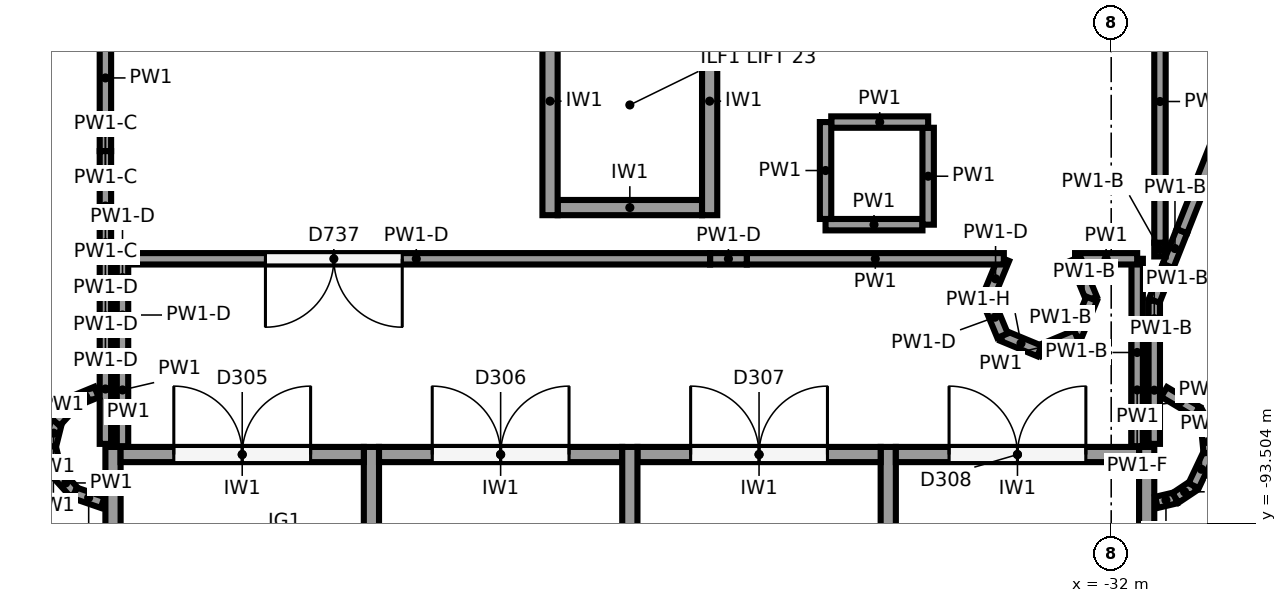
"""IFC4 building model, lengths in metres.
Left out: names, types, materials, properties, quantities, classifications, styles, units other than length and angle.
Written with IfcOpenShell. Run it as: python <this file> out.ifc"""

import sys

from ifc_helpers import new_model, si_unit, direction, frame, frame_2d, origin, origin_2d, place, context, subcontext, project, spatial, rectangle, circle, extrude, element, fill, save


model = new_model("IFC4")
c1 = context("Model", 3, precision=1e-05, world=origin(), true_north=direction((0.0, 1.0)))
c2 = subcontext(c1, "Body", "Model", "MODEL_VIEW")
j1 = project(units=[si_unit("LENGTHUNIT", "METRE"), si_unit("PLANEANGLEUNIT", "RADIAN")], contexts=[c1])
p1 = place(None, origin())
s1 = spatial("IfcSite", under=j1, at=p1, CompositionType="ELEMENT")
p2 = place(p1, origin())
s2 = spatial("IfcBuilding", under=s1, at=p2, CompositionType="ELEMENT")
p3 = place(p2, frame((0.0, 0.0, -4.0)))
s3 = spatial("IfcBuildingStorey", under=s2, at=p3, CompositionType="ELEMENT", Elevation=-4.0)
p4 = place(p3, frame((-46.333, -90.126, -1.2), z_axis=(0.0, 0.0, 1.0), x_axis=(1.0, 0.0, 0.0)))
e1 = element("IfcColumn", 1, at=p4, inside=s3, PredefinedType="COLUMN", context=c2, shape_type="SweptSolid", body=[
    extrude(circle(Radius=0.45, at=origin_2d()), origin(), (0.0, 0.0, 1.0), 5.2),
])
p5 = place(p3, frame((-32.944, -90.551, -1.2), z_axis=(0.0, 0.0, 1.0), x_axis=(1.0, 0.0, 0.0)))
e2 = element("IfcColumn", 2, at=p5, inside=s3, PredefinedType="COLUMN", context=c2, shape_type="SweptSolid", body=[
    extrude(circle(Radius=0.55, at=origin_2d()), origin(), (0.0, 0.0, 1.0), 5.2),
])
for number, where, z_axis, x_axis in (
    (3, (-45.133, -101.6, -1.2), (0.0, 0.0, 1.0), (0.0, 1.0, 0.0)),
    (4, (-38.333, -101.6, -1.2), (0.0, 0.0, 1.0), (0.0, 1.0, 0.0)),
    (5, (-31.533, -101.6, -1.2), (0.0, 0.0, 1.0), (0.0, 1.0, 0.0)),
    (6, (-41.733, -101.6, -1.2), (0.0, 0.0, 1.0), (0.0, 1.0, 0.0)),
    (7, (-34.933, -101.6, -1.2), (0.0, 0.0, 1.0), (0.0, 1.0, 0.0)),
):
    element("IfcWall", number, at=place(p3, frame(where, z_axis=z_axis, x_axis=x_axis)), inside=s3, PredefinedType="SHEAR", context=c2, shape_type="SweptSolid", body=[
        extrude(rectangle(XDim=9.1, YDim=0.2, at=frame_2d((4.55, 0.0))), origin(), (0.0, 0.0, 1.0), 4.8),
    ])
p6 = place(p3, frame((-45.033, -92.6, -1.2), z_axis=(0.0, 0.0, 1.0), x_axis=(1.0, 0.0, 0.0)))
e8 = element("IfcWall", 8, at=p6, inside=s3, PredefinedType="SHEAR", context=c2, shape_type="SweptSolid", body=[
    extrude(rectangle(XDim=3.2, YDim=0.2, at=frame_2d((1.6, 0.0))), origin(), (0.0, 0.0, 1.0), 4.8),
])
p7 = place(p6, frame((0.7, 0.0, 1.2)))
e9 = element("IfcOpeningElement", 9, at=p7, cuts=e8, PredefinedType="OPENING", context=c2, shape_type="SweptSolid", body=[
    extrude(rectangle(XDim=1.8, YDim=2.1, at=frame_2d((0.9, 1.05))), frame((0.0, 0.11, 0.0), z_axis=(0.0, -1.0, 0.0), x_axis=(1.0, 0.0, 0.0)), (0.0, 0.0, 1.0), 0.22),
])
p8 = place(p3, frame((-41.633, -92.6, -1.2), z_axis=(0.0, 0.0, 1.0), x_axis=(1.0, 0.0, 0.0)))
e10 = element("IfcWall", 10, at=p8, inside=s3, PredefinedType="SHEAR", context=c2, shape_type="SweptSolid", body=[
    extrude(rectangle(XDim=3.2, YDim=0.2, at=frame_2d((1.6, 0.0))), origin(), (0.0, 0.0, 1.0), 4.8),
])
p9 = place(p8, frame((0.7, 0.0, 1.2)))
e11 = element("IfcOpeningElement", 11, at=p9, cuts=e10, PredefinedType="OPENING", context=c2, shape_type="SweptSolid", body=[
    extrude(rectangle(XDim=1.8, YDim=2.1, at=frame_2d((0.9, 1.05))), frame((0.0, 0.11, 0.0), z_axis=(0.0, -1.0, 0.0), x_axis=(1.0, 0.0, 0.0)), (0.0, 0.0, 1.0), 0.22),
])
p10 = place(p3, frame((-38.233, -92.6, -1.2), z_axis=(0.0, 0.0, 1.0), x_axis=(1.0, 0.0, 0.0)))
e12 = element("IfcWall", 12, at=p10, inside=s3, PredefinedType="SHEAR", context=c2, shape_type="SweptSolid", body=[
    extrude(rectangle(XDim=3.2, YDim=0.2, at=frame_2d((1.6, 0.0))), origin(), (0.0, 0.0, 1.0), 4.8),
])
p11 = place(p10, frame((0.7, 0.0, 1.2)))
e13 = element("IfcOpeningElement", 13, at=p11, cuts=e12, PredefinedType="OPENING", context=c2, shape_type="SweptSolid", body=[
    extrude(rectangle(XDim=1.8, YDim=2.1, at=frame_2d((0.9, 1.05))), frame((0.0, 0.11, 0.0), z_axis=(0.0, -1.0, 0.0), x_axis=(1.0, 0.0, 0.0)), (0.0, 0.0, 1.0), 0.22),
])
p12 = place(p3, frame((-34.833, -92.6, -1.2), z_axis=(0.0, 0.0, 1.0), x_axis=(1.0, 0.0, 0.0)))
e14 = element("IfcWall", 14, at=p12, inside=s3, PredefinedType="SHEAR", context=c2, shape_type="SweptSolid", body=[
    extrude(rectangle(XDim=3.2, YDim=0.2, at=frame_2d((1.6, 0.0))), origin(), (0.0, 0.0, 1.0), 4.8),
])
p13 = place(p12, frame((0.7, 0.0, 1.2)))
e15 = element("IfcOpeningElement", 15, at=p13, cuts=e14, PredefinedType="OPENING", context=c2, shape_type="SweptSolid", body=[
    extrude(rectangle(XDim=1.8, YDim=2.1, at=frame_2d((0.9, 1.05))), frame((0.0, 0.11, 0.0), z_axis=(0.0, -1.0, 0.0), x_axis=(1.0, 0.0, 0.0)), (0.0, 0.0, 1.0), 0.22),
])
for number, where, z_axis, x_axis in (
    (16, (-39.383, -89.451, -1.2), (0.0, 0.0, 1.0), (0.0, 1.0, 0.0)),
    (17, (-37.283, -89.451, -1.2), (0.0, 0.0, 1.0), (0.0, 1.0, 0.0)),
):
    element("IfcWall", number, at=place(p3, frame(where, z_axis=z_axis, x_axis=x_axis)), inside=s3, PredefinedType="SHEAR", context=c2, shape_type="SweptSolid", body=[
        extrude(rectangle(XDim=3.0, YDim=0.2, at=frame_2d((1.5, 0.0))), origin(), (0.0, 0.0, 1.0), 4.8),
    ])
p14 = place(p3, frame((-39.283, -89.351, -1.2), z_axis=(0.0, 0.0, 1.0), x_axis=(1.0, 0.0, 0.0)))
e18 = element("IfcWall", 18, at=p14, inside=s3, PredefinedType="SHEAR", context=c2, shape_type="SweptSolid", body=[
    extrude(rectangle(XDim=1.9, YDim=0.2, at=frame_2d((0.95, 0.0))), origin(), (0.0, 0.0, 1.0), 4.8),
])
p15 = place(p3, frame((-45.233, -87.164, 0.0), z_axis=(0.0, 0.0, 1.0), x_axis=(0.0, -1.0, 0.0)))
e19 = element("IfcWall", 19, at=p15, inside=s3, PredefinedType="PARTITIONING", context=c2, shape_type="SweptSolid", body=[
    extrude(rectangle(XDim=0.963, YDim=0.15, at=frame_2d((0.481, 0.0))), origin(), (0.0, 0.0, 1.0), 3.6),
])
for number, where, z_axis, x_axis in (
    (20, (-45.233, -88.127, 0.0), (0.0, 0.0, 1.0), (0.0, -1.0, 0.0)),
    (21, (-45.233, -88.608, 0.0), (0.0, 0.0, 1.0), (0.0, -1.0, 0.0)),
    (22, (-45.233, -89.09, 0.0), (0.0, 0.0, 1.0), (0.0, -1.0, 0.0)),
):
    element("IfcWall", number, at=place(p3, frame(where, z_axis=z_axis, x_axis=x_axis)), inside=s3, PredefinedType="PARTITIONING", context=c2, shape_type="SweptSolid", body=[
        extrude(rectangle(XDim=0.481, YDim=0.15, at=frame_2d((0.241, 0.0))), origin(), (0.0, 0.0, 1.0), 2.7),
    ])
for number, where, z_axis, x_axis in (
    (23, (-45.233, -89.571, 0.0), (0.0, 0.0, 1.0), (0.0, -1.0, 0.0)),
    (24, (-45.233, -90.053, 0.0), (0.0, 0.0, 1.0), (0.0, -1.0, 0.0)),
    (25, (-45.233, -90.534, 0.0), (0.0, 0.0, 1.0), (0.0, -1.0, 0.0)),
):
    element("IfcWall", number, at=place(p3, frame(where, z_axis=z_axis, x_axis=x_axis)), inside=s3, PredefinedType="PARTITIONING", context=c2, shape_type="SweptSolid", body=[
        extrude(rectangle(XDim=0.481, YDim=0.15, at=frame_2d((0.241, 0.0))), origin(), (0.0, 0.0, 1.0), 2.3),
    ])
p16 = place(p3, frame((-45.233, -91.016, 0.0), z_axis=(0.0, 0.0, 1.0), x_axis=(0.0, -1.0, 0.0)))
e26 = element("IfcWall", 26, at=p16, inside=s3, PredefinedType="PARTITIONING", context=c2, shape_type="SweptSolid", body=[
    extrude(rectangle(XDim=1.444, YDim=0.15, at=frame_2d((0.722, 0.0))), origin(), (0.0, 0.0, 1.0), 3.6),
])
p17 = place(p3, frame((-31.433, -92.46, 0.0), z_axis=(0.0, 0.0, 1.0), x_axis=(0.0, 1.0, 0.0)))
e27 = element("IfcWall", 27, at=p17, inside=s3, PredefinedType="PARTITIONING", context=c2, shape_type="SweptSolid", body=[
    extrude(rectangle(XDim=1.413, YDim=0.15, at=frame_2d((0.706, 0.0))), origin(), (0.0, 0.0, 1.0), 3.6),
])
p18 = place(p3, frame((-31.433, -91.047, 0.0), z_axis=(0.0, 0.0, 1.0), x_axis=(0.0, 1.0, 0.0)))
e28 = element("IfcWall", 28, at=p18, inside=s3, PredefinedType="PARTITIONING", context=c2, shape_type="SweptSolid", body=[
    extrude(rectangle(XDim=0.471, YDim=0.15, at=frame_2d((0.235, 0.0))), origin(), (0.0, 0.0, 1.0), 2.5),
])
for number, where, z_axis, x_axis in (
    (29, (-31.433, -90.577, 0.0), (0.0, 0.0, 1.0), (0.369, 0.929, 0.0)),
    (30, (-31.252, -90.119, 0.0), (0.0, 0.0, 1.0), (0.369, 0.929, 0.0)),
):
    element("IfcWall", number, at=place(p3, frame(where, z_axis=z_axis, x_axis=x_axis)), inside=s3, PredefinedType="PARTITIONING", context=c2, shape_type="SweptSolid", body=[
        extrude(rectangle(XDim=0.492, YDim=0.15, at=frame_2d((0.246, 0.0))), origin(), (0.0, 0.0, 1.0), 2.5),
    ])
p19 = place(p3, frame((-31.07, -89.661, 0.0), z_axis=(0.0, 0.0, 1.0), x_axis=(0.368825125467, 0.9294988041, 0.0)))
e31 = element("IfcWall", 31, at=p19, inside=s3, PredefinedType="PARTITIONING", context=c2, shape_type="SweptSolid", body=[
    extrude(rectangle(XDim=2.462, YDim=0.15, at=frame_2d((1.231, 0.0))), origin(), (0.0, 0.0, 1.0), 3.6),
])
p20 = place(p3, frame((-35.758, -89.576, 0.0), z_axis=(0.0, 0.0, 1.0), x_axis=(1.0, 0.0, 0.0)))
e32 = element("IfcWall", 32, at=p20, inside=s3, PredefinedType="PARTITIONING", context=c2, shape_type="SweptSolid", body=[
    extrude(rectangle(XDim=1.275, YDim=0.15, at=frame_2d((0.637, 0.0))), origin(), (0.0, 0.0, 1.0), 3.6),
])
for number, where, z_axis, x_axis in (
    (33, (-34.408, -89.576, 0.0), (0.0, 0.0, 1.0), (0.0, 1.0, 0.0)),
    (34, (-34.408, -88.226, 0.0), (0.0, 0.0, 1.0), (-1.0, 0.0, 0.0)),
    (35, (-35.758, -88.226, 0.0), (0.0, 0.0, 1.0), (0.0, -1.0, 0.0)),
):
    element("IfcWall", number, at=place(p3, frame(where, z_axis=z_axis, x_axis=x_axis)), inside=s3, PredefinedType="PARTITIONING", context=c2, shape_type="SweptSolid", body=[
        extrude(rectangle(XDim=1.275, YDim=0.15, at=frame_2d((0.638, 0.0))), origin(), (0.0, 0.0, 1.0), 3.6),
    ])
p21 = place(p3, frame((-31.658, -92.49, 0.0), z_axis=(0.0, 0.0, 1.0), x_axis=(0.0, 1.0, 0.0)))
e36 = element("IfcWall", 36, at=p21, inside=s3, PredefinedType="PARTITIONING", context=c2, shape_type="SweptSolid", body=[
    extrude(rectangle(XDim=2.465, YDim=0.15, at=frame_2d((1.232, 0.0))), origin(), (0.0, 0.0, 1.0), 2.5),
])
p22 = place(p3, frame((-31.658, -92.49, 2.5), z_axis=(0.0, 0.0, 1.0), x_axis=(0.0, 1.0, 0.0)))
e37 = element("IfcWall", 37, at=p22, inside=s3, PredefinedType="PARTITIONING", context=c2, shape_type="SweptSolid", body=[
    extrude(rectangle(XDim=1.479, YDim=0.15, at=frame_2d((0.74, 0.0))), origin(), (0.0, 0.0, 1.0), 1.1),
])
p23 = place(p3, frame((-31.658, -90.025, 0.0), z_axis=(0.0, 0.0, 1.0), x_axis=(-1.0, 0.0, 0.0)))
e38 = element("IfcWall", 38, at=p23, inside=s3, PredefinedType="PARTITIONING", context=c2, shape_type="SweptSolid", body=[
    extrude(rectangle(XDim=0.817, YDim=0.15, at=frame_2d((0.409, 0.0))), origin(), (0.0, 0.0, 1.0), 3.6),
])
p24 = place(p3, frame((-32.475, -90.025, 0.0), z_axis=(0.0, 0.0, 1.0), x_axis=(0.382452777268, -0.923975039252, 0.0)))
e39 = element("IfcWall", 39, at=p24, inside=s3, PredefinedType="PARTITIONING", context=c2, shape_type="SweptSolid", body=[
    extrude(rectangle(XDim=0.569, YDim=0.15, at=frame_2d((0.285, 0.0))), origin(), (0.0, 0.0, 1.0), 2.5),
])
p25 = place(p3, frame((-32.258, -90.551, 0.0), z_axis=(0.0, 0.0, 1.0), x_axis=(-0.382666625355, -0.923886494024, 0.0)))
e40 = element("IfcWall", 40, at=p25, inside=s3, PredefinedType="PARTITIONING", context=c2, shape_type="SweptSolid", body=[
    extrude(rectangle(XDim=0.525, YDim=0.15, at=frame_2d((0.263, 0.0))), origin(), (0.0, 0.0, 1.0), 2.5),
])
p26 = place(p3, frame((-32.458, -91.036, 0.0), z_axis=(0.0, 0.0, 1.0), x_axis=(-0.923694016012, -0.383131002117, 0.0)))
e41 = element("IfcWall", 41, at=p26, inside=s3, PredefinedType="PARTITIONING", context=c2, shape_type="SweptSolid", body=[
    extrude(rectangle(XDim=0.526, YDim=0.15, at=frame_2d((0.263, 0.0))), origin(), (0.0, 0.0, 1.0), 3.6),
])
p27 = place(p3, frame((-32.944, -91.238, 0.0), z_axis=(0.0, 0.0, 1.0), x_axis=(-0.923625802966, 0.383295416221, 0.0)))
e42 = element("IfcWall", 42, at=p27, inside=s3, PredefinedType="PARTITIONING", context=c2, shape_type="SweptSolid", body=[
    extrude(rectangle(XDim=0.525, YDim=0.15, at=frame_2d((0.263, 0.0))), origin(), (0.0, 0.0, 1.0), 3.0),
])
p28 = place(p3, frame((-33.429, -91.036, 0.0), z_axis=(0.0, 0.0, 1.0), x_axis=(-0.382666625355, 0.923886494024, 0.0)))
e43 = element("IfcWall", 43, at=p28, inside=s3, PredefinedType="PARTITIONING", context=c2, shape_type="SweptSolid", body=[
    extrude(rectangle(XDim=0.525, YDim=0.15, at=frame_2d((0.263, 0.0))), origin(), (0.0, 0.0, 1.0), 2.3),
])
p29 = place(p3, frame((-33.63, -90.551, 0.0), z_axis=(0.0, 0.0, 1.0), x_axis=(0.382452777268, 0.923975039252, 0.0)))
e44 = element("IfcWall", 44, at=p29, inside=s3, PredefinedType="PARTITIONING", context=c2, shape_type="SweptSolid", body=[
    extrude(rectangle(XDim=0.569, YDim=0.15, at=frame_2d((0.285, 0.0))), origin(), (0.0, 0.0, 1.0), 2.3),
])
p30 = place(p3, frame((-33.413, -90.025, 0.0), z_axis=(0.0, 0.0, 1.0), x_axis=(-1.0, 0.0, 0.0)))
e45 = element("IfcWall", 45, at=p30, inside=s3, PredefinedType="PARTITIONING", context=c2, shape_type="SweptSolid", body=[
    extrude(rectangle(XDim=3.382, YDim=0.15, at=frame_2d((1.691, 0.0))), origin(), (0.0, 0.0, 1.0), 3.6),
])
p31 = place(p3, frame((-36.795, -90.025, 0.0), z_axis=(0.0, 0.0, 1.0), x_axis=(-1.0, 0.0, 0.0)))
e46 = element("IfcWall", 46, at=p31, inside=s3, PredefinedType="PARTITIONING", context=c2, shape_type="SweptSolid", body=[
    extrude(rectangle(XDim=0.483, YDim=0.15, at=frame_2d((0.242, 0.0))), origin(), (0.0, 0.0, 1.0), 2.3),
])
p32 = place(p3, frame((-37.278, -90.025, 0.0), z_axis=(0.0, 0.0, 1.0), x_axis=(-1.0, 0.0, 0.0)))
e47 = element("IfcWall", 47, at=p32, inside=s3, PredefinedType="PARTITIONING", context=c2, shape_type="SweptSolid", body=[
    extrude(rectangle(XDim=7.73, YDim=0.15, at=frame_2d((3.865, 0.0))), origin(), (0.0, 0.0, 1.0), 2.3),
])
p33 = place(p32, frame((4.05, 0.0, 0.0)))
e48 = element("IfcOpeningElement", 48, at=p33, cuts=e47, PredefinedType="OPENING", context=c2, shape_type="SweptSolid", body=[
    extrude(rectangle(XDim=1.8, YDim=2.1, at=frame_2d((0.9, 1.05))), frame((0.0, 0.085, 0.0), z_axis=(0.0, -1.0, 0.0), x_axis=(1.0, 0.0, 0.0)), (0.0, 0.0, 1.0), 0.17),
])
p34 = place(p3, frame((-45.008, -90.025, 0.0), z_axis=(0.0, 0.0, 1.0), x_axis=(0.0, -1.0, 0.0)))
e49 = element("IfcWall", 49, at=p34, inside=s3, PredefinedType="PARTITIONING", context=c2, shape_type="SweptSolid", body=[
    extrude(rectangle(XDim=0.493, YDim=0.15, at=frame_2d((0.247, 0.0))), origin(), (0.0, 0.0, 1.0), 2.3),
])
p35 = place(p3, frame((-45.008, -90.518, 0.0), z_axis=(0.0, 0.0, 1.0), x_axis=(0.0, -1.0, 0.0)))
e50 = element("IfcWall", 50, at=p35, inside=s3, PredefinedType="PARTITIONING", context=c2, shape_type="SweptSolid", body=[
    extrude(rectangle(XDim=0.493, YDim=0.15, at=frame_2d((0.247, 0.0))), origin(), (0.0, 0.0, 1.0), 2.3),
])
p36 = place(p3, frame((-45.008, -91.011, 0.0), z_axis=(0.0, 0.0, 1.0), x_axis=(0.0, -1.0, 0.0)))
e51 = element("IfcWall", 51, at=p36, inside=s3, PredefinedType="PARTITIONING", context=c2, shape_type="SweptSolid", body=[
    extrude(rectangle(XDim=1.479, YDim=0.15, at=frame_2d((0.74, 0.0))), origin(), (0.0, 0.0, 1.0), 3.6),
])
p37 = place(p3, frame((-45.87, -92.137, 0.0), z_axis=(0.0, 0.0, 1.0), x_axis=(-0.243149105267, -0.969988923961, 0.0)))
e52 = element("IfcWall", 52, at=p37, inside=s3, PredefinedType="PARTITIONING", context=c2, shape_type="SweptSolid", body=[
    extrude(rectangle(XDim=0.375, YDim=0.15, at=frame_2d((0.187, 0.0))), origin(), (0.0, 0.0, 1.0), 3.6),
])
p38 = place(p3, frame((-45.961, -92.5, 0.0), z_axis=(0.0, 0.0, 1.0), x_axis=(0.243185799972, -0.969979724887, 0.0)))
e53 = element("IfcWall", 53, at=p38, inside=s3, PredefinedType="PARTITIONING", context=c2, shape_type="SweptSolid", body=[
    extrude(rectangle(XDim=0.353, YDim=0.15, at=frame_2d((0.177, 0.0))), origin(), (0.0, 0.0, 1.0), 3.6),
])
p39 = place(p3, frame((-45.875, -92.843, 0.0), z_axis=(0.0, 0.0, 1.0), x_axis=(0.671779735796, -0.740750961237, 0.0)))
e54 = element("IfcWall", 54, at=p39, inside=s3, PredefinedType="PARTITIONING", context=c2, shape_type="SweptSolid", body=[
    extrude(rectangle(XDim=0.354, YDim=0.15, at=frame_2d((0.177, 0.0))), origin(), (0.0, 0.0, 1.0), 3.6),
])
p40 = place(p3, frame((-45.637, -93.105, 0.0), z_axis=(0.0, 0.0, 1.0), x_axis=(0.945426446164, -0.325835594885, 0.0)))
e55 = element("IfcWall", 55, at=p40, inside=s3, PredefinedType="PARTITIONING", context=c2, shape_type="SweptSolid", body=[
    extrude(rectangle(XDim=0.388, YDim=0.15, at=frame_2d((0.194, 0.0))), origin(), (0.0, 0.0, 1.0), 3.6),
])
p41 = place(p3, frame((-31.405, -93.23, 0.0), z_axis=(0.0, 0.0, 1.0), x_axis=(0.973130593004, 0.230253879357, 0.0)))
e56 = element("IfcWall", 56, at=p41, inside=s3, PredefinedType="PARTITIONING", context=c2, shape_type="SweptSolid", body=[
    extrude(rectangle(XDim=0.258, YDim=0.15, at=frame_2d((0.129, 0.0))), origin(), (0.0, 0.0, 1.0), 3.6),
])
p42 = place(p3, frame((-31.154, -93.17, 0.0), z_axis=(0.0, 0.0, 1.0), x_axis=(0.831397130511, 0.555678694372, 0.0)))
e57 = element("IfcWall", 57, at=p42, inside=s3, PredefinedType="PARTITIONING", context=c2, shape_type="SweptSolid", body=[
    extrude(rectangle(XDim=0.288, YDim=0.15, at=frame_2d((0.144, 0.0))), origin(), (0.0, 0.0, 1.0), 3.6),
])
p43 = place(p3, frame((-30.915, -93.01, 0.0), z_axis=(0.0, 0.0, 1.0), x_axis=(0.427757963167, 0.903893315025, 0.0)))
e58 = element("IfcWall", 58, at=p43, inside=s3, PredefinedType="PARTITIONING", context=c2, shape_type="SweptSolid", body=[
    extrude(rectangle(XDim=0.479, YDim=0.15, at=frame_2d((0.24, 0.0))), origin(), (0.0, 0.0, 1.0), 3.6),
])
p44 = place(p3, frame((-30.71, -92.577, 0.0), z_axis=(0.0, 0.0, 1.0), x_axis=(-0.0978334953, 0.99520279702, 0.0)))
e59 = element("IfcWall", 59, at=p44, inside=s3, PredefinedType="PARTITIONING", context=c2, shape_type="SweptSolid", body=[
    extrude(rectangle(XDim=0.29, YDim=0.15, at=frame_2d((0.145, 0.0))), origin(), (0.0, 0.0, 1.0), 3.6),
])
p45 = place(p3, frame((-30.738, -92.289, 0.0), z_axis=(0.0, 0.0, 1.0), x_axis=(-0.471682765858, 0.881768319, 0.0)))
e60 = element("IfcWall", 60, at=p45, inside=s3, PredefinedType="PARTITIONING", context=c2, shape_type="SweptSolid", body=[
    extrude(rectangle(XDim=0.289, YDim=0.15, at=frame_2d((0.145, 0.0))), origin(), (0.0, 0.0, 1.0), 3.6),
])
p46 = place(p3, frame((-30.875, -92.034, 0.0), z_axis=(0.0, 0.0, 1.0), x_axis=(-0.85856712863, 0.512701166017, 0.0)))
e61 = element("IfcWall", 61, at=p46, inside=s3, PredefinedType="PARTITIONING", context=c2, shape_type="SweptSolid", body=[
    extrude(rectangle(XDim=0.5, YDim=0.15, at=frame_2d((0.25, 0.0))), origin(), (0.0, 0.0, 1.0), 3.6),
])
p47 = place(p3, frame((-31.358, -89.994, 0.0), z_axis=(0.0, 0.0, 1.0), x_axis=(0.0, 1.0, 0.0)))
e62 = element("IfcWall", 62, at=p47, inside=s3, PredefinedType="PARTITIONING", context=c2, shape_type="SweptSolid", body=[
    extrude(rectangle(XDim=0.181, YDim=0.15, at=frame_2d((0.09, 0.0))), origin(), (0.0, 0.0, 1.0), 2.5),
])
p48 = place(p3, frame((-31.358, -89.813, 0.0), z_axis=(0.0, 0.0, 1.0), x_axis=(0.0, 1.0, 0.0)))
e63 = element("IfcWall", 63, at=p48, inside=s3, PredefinedType="PARTITIONING", context=c2, shape_type="SweptSolid", body=[
    extrude(rectangle(XDim=3.715, YDim=0.15, at=frame_2d((1.857, 0.0))), origin(), (0.0, 0.0, 1.0), 3.6),
])
p49 = place(p3, frame((-45.35, -91.778, 0.0), z_axis=(0.0, 0.0, 1.0), x_axis=(-0.924710471816, -0.380671174788, 0.0)))
e64 = element("IfcWall", 64, at=p49, inside=s3, PredefinedType="PARTITIONING", context=c2, shape_type="SweptSolid", body=[
    extrude(rectangle(XDim=0.312, YDim=0.15, at=frame_2d((0.156, 0.0))), origin(), (0.0, 0.0, 1.0), 3.6),
])
p50 = place(p3, frame((-45.639, -91.896, 0.0), z_axis=(0.0, 0.0, 1.0), x_axis=(-0.671204763042, -0.741271991964, 0.0)))
e65 = element("IfcWall", 65, at=p50, inside=s3, PredefinedType="PARTITIONING", context=c2, shape_type="SweptSolid", body=[
    extrude(rectangle(XDim=0.373, YDim=0.15, at=frame_2d((0.187, 0.0))), origin(), (0.0, 0.0, 1.0), 3.6),
])
p51 = place(p7, origin())
e66 = element("IfcDoor", 66, at=p51, inside=s3, OperationType="DOUBLE_DOOR_SINGLE_SWING", PredefinedType="DOOR", context=c2, shape_type="SweptSolid", body=[
    extrude(rectangle(XDim=1.8, YDim=2.1, at=frame_2d((0.9, 1.05))), frame((0.0, 0.025, 0.0), z_axis=(0.0, -1.0, 0.0), x_axis=(1.0, 0.0, 0.0)), (0.0, 0.0, 1.0), 0.05),
])
fill(e9, e66)
p52 = place(p9, origin())
e67 = element("IfcDoor", 67, at=p52, inside=s3, OperationType="DOUBLE_DOOR_SINGLE_SWING", PredefinedType="DOOR", context=c2, shape_type="SweptSolid", body=[
    extrude(rectangle(XDim=1.8, YDim=2.1, at=frame_2d((0.9, 1.05))), frame((0.0, 0.025, 0.0), z_axis=(0.0, -1.0, 0.0), x_axis=(1.0, 0.0, 0.0)), (0.0, 0.0, 1.0), 0.05),
])
fill(e11, e67)
p53 = place(p11, origin())
e68 = element("IfcDoor", 68, at=p53, inside=s3, OperationType="DOUBLE_DOOR_SINGLE_SWING", PredefinedType="DOOR", context=c2, shape_type="SweptSolid", body=[
    extrude(rectangle(XDim=1.8, YDim=2.1, at=frame_2d((0.9, 1.05))), frame((0.0, 0.025, 0.0), z_axis=(0.0, -1.0, 0.0), x_axis=(1.0, 0.0, 0.0)), (0.0, 0.0, 1.0), 0.05),
])
fill(e13, e68)
p54 = place(p13, origin())
e69 = element("IfcDoor", 69, at=p54, inside=s3, OperationType="DOUBLE_DOOR_SINGLE_SWING", PredefinedType="DOOR", context=c2, shape_type="SweptSolid", body=[
    extrude(rectangle(XDim=1.8, YDim=2.1, at=frame_2d((0.9, 1.05))), frame((0.0, 0.025, 0.0), z_axis=(0.0, -1.0, 0.0), x_axis=(1.0, 0.0, 0.0)), (0.0, 0.0, 1.0), 0.05),
])
fill(e15, e69)
p55 = place(p33, origin())
e70 = element("IfcDoor", 70, at=p55, inside=s3, OperationType="DOUBLE_DOOR_SINGLE_SWING", PredefinedType="DOOR", context=c2, shape_type="SweptSolid", body=[
    extrude(rectangle(XDim=1.8, YDim=2.1, at=frame_2d((0.9, 1.05))), frame((0.0, 0.025, 0.0), z_axis=(0.0, -1.0, 0.0), x_axis=(1.0, 0.0, 0.0)), (0.0, 0.0, 1.0), 0.05),
])
fill(e48, e70)
save(model, sys.argv[1])
